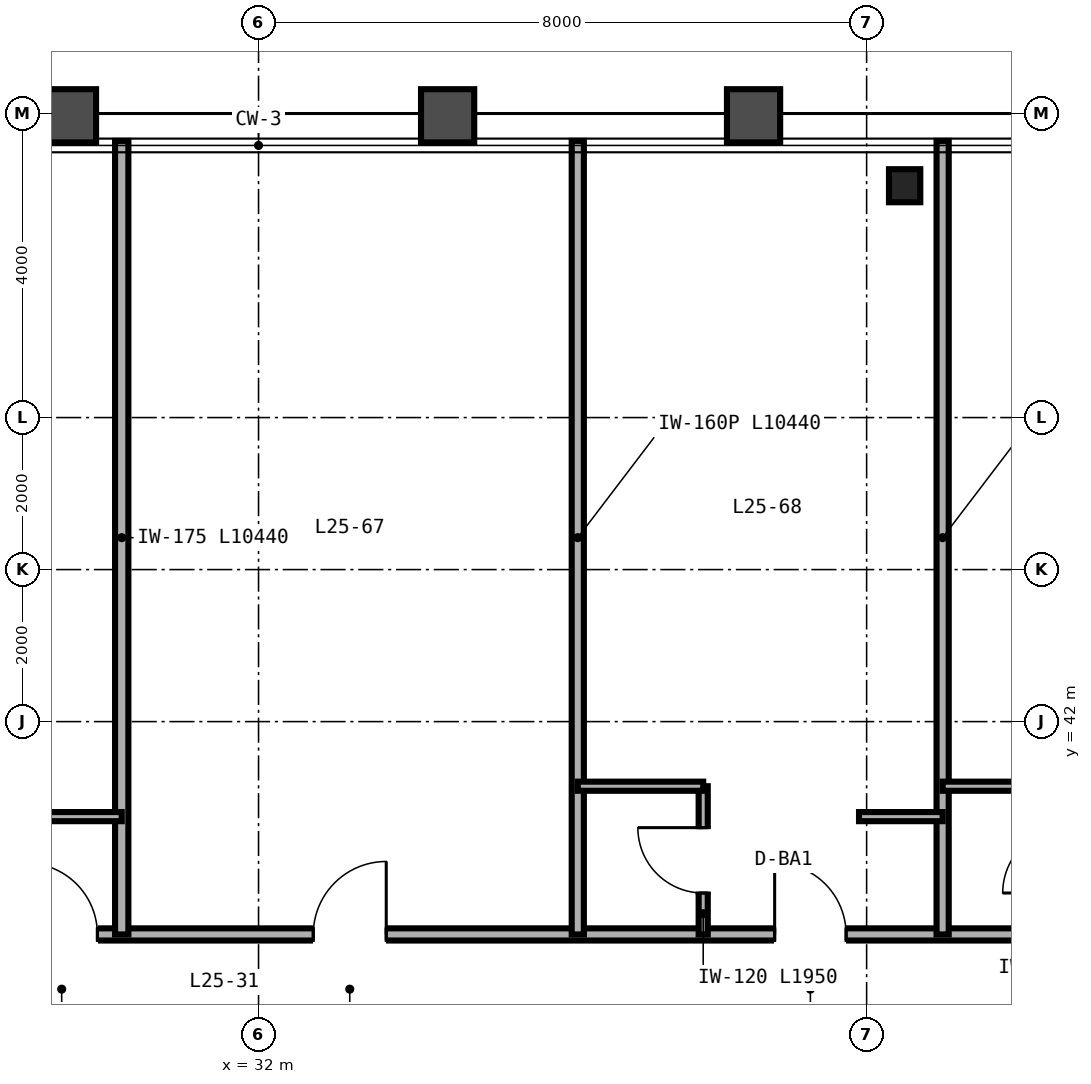
"""IFC4 building model, lengths in metres.
Left out: names, types, materials, properties, quantities, classifications, styles, units other than length and angle.
Written with IfcOpenShell. Run it as: python <this file> out.ifc"""

import sys

from ifc_helpers import new_model, si_unit, direction, frame, frame_2d, origin, origin_2d, place, context, subcontext, project, spatial, rectangle, i_section, extrude, source, transform, mapped, element, fill, save


model = new_model("IFC4")
c1 = context("Model", 3, precision=1e-05, world=origin(), true_north=direction((0.0, 1.0)))
c2 = subcontext(c1, "Body", "Model", "MODEL_VIEW")
j1 = project(units=[si_unit("LENGTHUNIT", "METRE"), si_unit("PLANEANGLEUNIT", "RADIAN")], contexts=[c1])
p1 = place(None, origin())
s1 = spatial("IfcSite", under=j1, at=p1, CompositionType="ELEMENT")
p2 = place(p1, origin())
s2 = spatial("IfcBuilding", under=s1, at=p2, CompositionType="ELEMENT")
p3 = place(p2, frame((0.0, 0.0, 104.4)))
s3 = spatial("IfcBuildingStorey", under=s2, at=p3, CompositionType="ELEMENT", Elevation=104.4)
m1 = source(origin(), c2, "Body", "SweptSolid", [
    extrude(i_section(OverallWidth=0.412, OverallDepth=0.435, WebThickness=0.036, FlangeThickness=0.057, FilletRadius=0.025, at=origin_2d()), origin(), (0.0, 0.0, 1.0), 3.36),
])
p4 = place(p3, frame((40.5, 49.05, 0.0), z_axis=(0.0, 0.0, 1.0), x_axis=(1.0, 0.0, 0.0)))
e1 = element("IfcColumn", 1, at=p4, inside=s3, PredefinedType="COLUMN", context=c2, shape_type="MappedRepresentation", body=[
    mapped(m1, transform((0.0, 0.0, 0.0), scale=1.0)),
])
p5 = place(p3, frame((14.0, 39.2, 0.0), z_axis=(0.0, 0.0, 1.0), x_axis=(1.0, 0.0, 0.0)))
e2 = element("IfcWall", 2, at=p5, inside=s3, PredefinedType="PARTITIONING", context=c2, shape_type="SweptSolid", body=[
    extrude(rectangle(XDim=36.0, YDim=0.16, at=frame_2d((18.0, 0.0))), origin(), (0.0, 0.0, 1.0), 2.581),
])
p6 = place(p5, frame((3.94, 0.0, 0.0)))
e3 = element("IfcOpeningElement", 3, at=p6, cuts=e2, PredefinedType="OPENING", context=c2, shape_type="SweptSolid", body=[
    extrude(rectangle(XDim=0.94, YDim=2.15, at=frame_2d((0.47, 1.075))), frame((0.0, 0.09, 0.0), z_axis=(0.0, -1.0, 0.0), x_axis=(1.0, 0.0, 0.0)), (0.0, 0.0, 1.0), 0.18),
])
p7 = place(p5, frame((7.89, 0.0, 0.0)))
e4 = element("IfcOpeningElement", 4, at=p7, cuts=e2, PredefinedType="OPENING", context=c2, shape_type="SweptSolid", body=[
    extrude(rectangle(XDim=0.94, YDim=2.15, at=frame_2d((0.47, 1.075))), frame((0.0, 0.09, 0.0), z_axis=(0.0, -1.0, 0.0), x_axis=(1.0, 0.0, 0.0)), (0.0, 0.0, 1.0), 0.18),
])
p8 = place(p5, frame((14.94, 0.0, 0.0)))
e5 = element("IfcOpeningElement", 5, at=p8, cuts=e2, PredefinedType="OPENING", context=c2, shape_type="SweptSolid", body=[
    extrude(rectangle(XDim=0.94, YDim=2.15, at=frame_2d((0.47, 1.075))), frame((0.0, 0.09, 0.0), z_axis=(0.0, -1.0, 0.0), x_axis=(1.0, 0.0, 0.0)), (0.0, 0.0, 1.0), 0.18),
])
p9 = place(p5, frame((18.72, 0.0, 0.0)))
e6 = element("IfcOpeningElement", 6, at=p9, cuts=e2, PredefinedType="OPENING", context=c2, shape_type="SweptSolid", body=[
    extrude(rectangle(XDim=0.96, YDim=2.15, at=frame_2d((0.48, 1.075))), frame((0.0, 0.09, 0.0), z_axis=(0.0, -1.0, 0.0), x_axis=(1.0, 0.0, 0.0)), (0.0, 0.0, 1.0), 0.18),
])
p10 = place(p5, frame((24.79, 0.0, 0.0)))
e7 = element("IfcOpeningElement", 7, at=p10, cuts=e2, PredefinedType="OPENING", context=c2, shape_type="SweptSolid", body=[
    extrude(rectangle(XDim=0.94, YDim=2.15, at=frame_2d((0.47, 1.075))), frame((0.0, 0.09, 0.0), z_axis=(0.0, -1.0, 0.0), x_axis=(1.0, 0.0, 0.0)), (0.0, 0.0, 1.0), 0.18),
])
p11 = place(p5, frame((30.34, 0.0, 0.0)))
e8 = element("IfcOpeningElement", 8, at=p11, cuts=e2, PredefinedType="OPENING", context=c2, shape_type="SweptSolid", body=[
    extrude(rectangle(XDim=0.94, YDim=2.15, at=frame_2d((0.47, 1.075))), frame((0.0, 0.09, 0.0), z_axis=(0.0, -1.0, 0.0), x_axis=(1.0, 0.0, 0.0)), (0.0, 0.0, 1.0), 0.18),
])
p12 = place(p5, frame((34.74, 0.0, 0.0)))
e9 = element("IfcOpeningElement", 9, at=p12, cuts=e2, PredefinedType="OPENING", context=c2, shape_type="SweptSolid", body=[
    extrude(rectangle(XDim=0.94, YDim=2.15, at=frame_2d((0.47, 1.075))), frame((0.0, 0.09, 0.0), z_axis=(0.0, -1.0, 0.0), x_axis=(1.0, 0.0, 0.0)), (0.0, 0.0, 1.0), 0.18),
])
p13 = place(p3, frame((30.2, 39.2, 0.0), z_axis=(0.0, 0.0, 1.0), x_axis=(0.0, 1.0, 0.0)))
e10 = element("IfcWall", 10, at=p13, inside=s3, PredefinedType="PARTITIONING", context=c2, shape_type="SweptSolid", body=[
    extrude(rectangle(XDim=10.44, YDim=0.175, at=frame_2d((5.22, 0.0))), origin(), (0.0, 0.0, 1.0), 2.433),
])
p14 = place(p3, frame((29.1, 40.75, 0.0), z_axis=(0.0, 0.0, 1.0), x_axis=(1.0, 0.0, 0.0)))
e11 = element("IfcWall", 11, at=p14, inside=s3, PredefinedType="PARTITIONING", context=c2, shape_type="SweptSolid", body=[
    extrude(rectangle(XDim=1.1, YDim=0.12, at=frame_2d((0.55, 0.0))), origin(), (0.0, 0.0, 1.0), 3.36),
])
p15 = place(p3, frame((36.2, 39.2, 0.0), z_axis=(0.0, 0.0, 1.0), x_axis=(0.0, 1.0, 0.0)))
e12 = element("IfcWall", 12, at=p15, inside=s3, PredefinedType="PARTITIONING", context=c2, shape_type="SweptSolid", body=[
    extrude(rectangle(XDim=10.44, YDim=0.16, at=frame_2d((5.22, 0.0))), origin(), (0.0, 0.0, 1.0), 2.433),
])
p16 = place(p3, frame((41.0, 39.2, 0.0), z_axis=(0.0, 0.0, 1.0), x_axis=(0.0, 1.0, 0.0)))
e13 = element("IfcWall", 13, at=p16, inside=s3, PredefinedType="PARTITIONING", context=c2, shape_type="SweptSolid", body=[
    extrude(rectangle(XDim=10.44, YDim=0.16, at=frame_2d((5.22, 0.0))), origin(), (0.0, 0.0, 1.0), 2.823),
])
p17 = place(p3, frame((37.85, 39.2, 0.0), z_axis=(0.0, 0.0, 1.0), x_axis=(0.0, 1.0, 0.0)))
e14 = element("IfcWall", 14, at=p17, inside=s3, PredefinedType="PARTITIONING", context=c2, shape_type="SweptSolid", body=[
    extrude(rectangle(XDim=1.95, YDim=0.12, at=frame_2d((0.975, 0.0))), origin(), (0.0, 0.0, 1.0), 3.36),
])
p18 = place(p17, frame((0.545, 0.0, 0.0)))
e15 = element("IfcOpeningElement", 15, at=p18, cuts=e14, PredefinedType="OPENING", context=c2, shape_type="SweptSolid", body=[
    extrude(rectangle(XDim=0.86, YDim=2.1, at=frame_2d((0.43, 1.05))), frame((0.0, 0.07, 0.0), z_axis=(0.0, -1.0, 0.0), x_axis=(1.0, 0.0, 0.0)), (0.0, 0.0, 1.0), 0.14),
])
p19 = place(p3, frame((36.2, 41.15, 0.0), z_axis=(0.0, 0.0, 1.0), x_axis=(1.0, 0.0, 0.0)))
e16 = element("IfcWall", 16, at=p19, inside=s3, PredefinedType="PARTITIONING", context=c2, shape_type="SweptSolid", body=[
    extrude(rectangle(XDim=1.65, YDim=0.12, at=frame_2d((0.825, 0.0))), origin(), (0.0, 0.0, 1.0), 3.36),
])
p20 = place(p3, frame((39.9, 40.75, 0.0), z_axis=(0.0, 0.0, 1.0), x_axis=(1.0, 0.0, 0.0)))
e17 = element("IfcWall", 17, at=p20, inside=s3, PredefinedType="PARTITIONING", context=c2, shape_type="SweptSolid", body=[
    extrude(rectangle(XDim=1.1, YDim=0.12, at=frame_2d((0.55, 0.0))), origin(), (0.0, 0.0, 1.0), 2.581),
])
p21 = place(p3, frame((41.0, 41.15, 0.0), z_axis=(0.0, 0.0, 1.0), x_axis=(1.0, 0.0, 0.0)))
e18 = element("IfcWall", 18, at=p21, inside=s3, PredefinedType="PARTITIONING", context=c2, shape_type="SweptSolid", body=[
    extrude(rectangle(XDim=1.65, YDim=0.12, at=frame_2d((0.825, 0.0))), origin(), (0.0, 0.0, 1.0), 3.36),
])
m2 = source(origin(), c2, "Body", "SweptSolid", [
    extrude(rectangle(XDim=0.86, YDim=2.1, at=frame_2d((0.43, 1.05))), frame((0.0, 0.025, 0.0), z_axis=(0.0, -1.0, 0.0), x_axis=(1.0, 0.0, 0.0)), (0.0, 0.0, 1.0), 0.05),
])
p22 = place(p18, origin())
e19 = element("IfcDoor", 19, at=p22, inside=s3, OperationType="SINGLE_SWING_RIGHT", PredefinedType="DOOR", context=c2, shape_type="MappedRepresentation", body=[
    mapped(m2, transform((0.0, 0.0, 0.0), scale=1.0)),
])
fill(e15, e19)
m3 = source(origin(), c2, "Body", "SweptSolid", [
    extrude(rectangle(XDim=0.94, YDim=2.15, at=frame_2d((0.47, 1.075))), frame((0.0, 0.025, 0.0), z_axis=(0.0, -1.0, 0.0), x_axis=(1.0, 0.0, 0.0)), (0.0, 0.0, 1.0), 0.05),
])
p23 = place(p8, origin())
e20 = element("IfcDoor", 20, at=p23, inside=s3, OperationType="SINGLE_SWING_LEFT", PredefinedType="DOOR", context=c2, shape_type="MappedRepresentation", body=[
    mapped(m3, transform((0.0, 0.0, 0.0), scale=1.0)),
])
fill(e5, e20)
m4 = source(origin(), c2, "Body", "SweptSolid", [
    extrude(rectangle(XDim=0.96, YDim=2.15, at=frame_2d((0.48, 1.075))), frame((0.0, 0.025, 0.0), z_axis=(0.0, -1.0, 0.0), x_axis=(1.0, 0.0, 0.0)), (0.0, 0.0, 1.0), 0.05),
])
p24 = place(p9, origin())
e21 = element("IfcDoor", 21, at=p24, inside=s3, OperationType="SINGLE_SWING_RIGHT", PredefinedType="DOOR", context=c2, shape_type="MappedRepresentation", body=[
    mapped(m4, transform((0.0, 0.0, 0.0), scale=1.0)),
])
fill(e6, e21)
p25 = place(p10, origin())
e22 = element("IfcDoor", 22, at=p25, inside=s3, OperationType="SINGLE_SWING_LEFT", PredefinedType="DOOR", context=c2, shape_type="MappedRepresentation", body=[
    mapped(m3, transform((0.0, 0.0, 0.0), scale=1.0)),
])
fill(e7, e22)
save(model, sys.argv[1])
